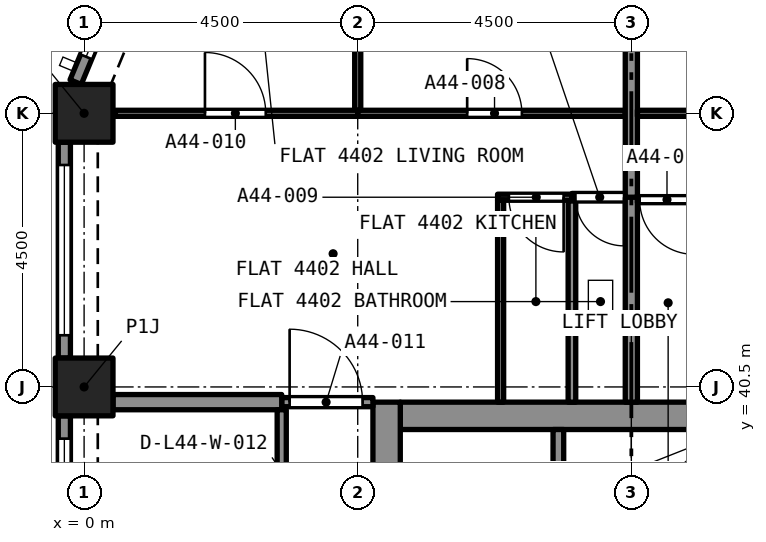
"""IFC4 building model, lengths in metres.
Left out: names, types, materials, properties, quantities, classifications, styles, units other than length and angle.
Written with IfcOpenShell. Run it as: python <this file> out.ifc"""

import sys

from ifc_helpers import new_model, si_unit, direction, frame, frame_2d, origin, origin_2d, place, context, subcontext, project, spatial, rectangle, extrude, element, fill, save


model = new_model("IFC4")
c1 = context("Model", 3, precision=1e-05, world=origin(), true_north=direction((0.0, 1.0)))
c2 = subcontext(c1, "Body", "Model", "MODEL_VIEW")
j1 = project(units=[si_unit("LENGTHUNIT", "METRE"), si_unit("PLANEANGLEUNIT", "RADIAN")], contexts=[c1])
p1 = place(None, origin())
s1 = spatial("IfcSite", under=j1, at=p1, CompositionType="ELEMENT")
p2 = place(p1, origin())
s2 = spatial("IfcBuilding", under=s1, at=p2, CompositionType="ELEMENT")
p3 = place(p2, frame((0.0, 0.0, 159.4)))
s3 = spatial("IfcBuildingStorey", under=s2, at=p3, CompositionType="ELEMENT", Elevation=159.4)
for number, where, z_axis, x_axis in (
    (1, (0.0, 40.5, 0.0), (0.0, 0.0, 1.0), (1.0, 0.0, 0.0)),
    (2, (0.0, 45.0, 0.0), (0.0, 0.0, 1.0), (1.0, 0.0, 0.0)),
):
    element("IfcColumn", number, at=place(p3, frame(where, z_axis=z_axis, x_axis=x_axis)), inside=s3, PredefinedType="COLUMN", context=c2, shape_type="SweptSolid", body=[
        extrude(rectangle(XDim=0.95, YDim=0.95, at=origin_2d()), origin(), (0.0, 0.0, 1.0), 4.4),
    ])
p4 = place(p3, frame((5.2, 40.025, 0.0), z_axis=(0.0, 0.0, 1.0), x_axis=(1.0, 0.0, 0.0)))
e3 = element("IfcWall", 3, at=p4, inside=s3, PredefinedType="SOLIDWALL", context=c2, shape_type="SweptSolid", body=[
    extrude(rectangle(XDim=7.6, YDim=0.45, at=frame_2d((3.8, 0.0))), origin(), (0.0, 0.0, 1.0), 4.4),
])
p5 = place(p3, frame((4.975, 27.25, 0.0), z_axis=(0.0, 0.0, 1.0), x_axis=(0.0, 1.0, 0.0)))
e4 = element("IfcWall", 4, at=p5, inside=s3, PredefinedType="SOLIDWALL", context=c2, shape_type="SweptSolid", body=[
    extrude(rectangle(XDim=13.0, YDim=0.45, at=frame_2d((6.5, 0.0))), origin(), (0.0, 0.0, 1.0), 4.4),
])
p6 = place(p5, frame((8.7, 0.0, 0.0)))
e5 = element("IfcOpeningElement", 5, at=p6, cuts=e4, PredefinedType="OPENING", context=c2, shape_type="SweptSolid", body=[
    extrude(rectangle(XDim=1.2, YDim=2.1, at=frame_2d((0.6, 1.05))), frame((0.0, 0.235, 0.0), z_axis=(0.0, -1.0, 0.0), x_axis=(1.0, 0.0, 0.0)), (0.0, 0.0, 1.0), 0.47),
])
p7 = place(p3, frame((-0.139, 45.513, 0.0), z_axis=(0.0, 0.0, 1.0), x_axis=(0.382680855588, 0.923880599843, 0.0)))
e6 = element("IfcWall", 6, at=p7, inside=s3, PredefinedType="SOLIDWALL", context=c2, shape_type="SweptSolid", body=[
    extrude(rectangle(XDim=2.403, YDim=0.2, at=frame_2d((1.201, 0.0))), origin(), (0.0, 0.0, 1.0), 4.4),
])
p8 = place(p7, frame((0.451, 0.0, 0.45)))
e7 = element("IfcOpeningElement", 7, at=p8, cuts=e6, PredefinedType="OPENING", context=c2, shape_type="SweptSolid", body=[
    extrude(rectangle(XDim=1.7, YDim=2.55, at=frame_2d((0.85, 1.275))), frame((0.0, 0.11, 0.0), z_axis=(0.0, -1.0, 0.0), x_axis=(1.0, 0.0, 0.0)), (0.0, 0.0, 1.0), 0.22),
])
p9 = place(p3, frame((-0.325, 40.975, 0.0), z_axis=(0.0, 0.0, 1.0), x_axis=(0.0, 1.0, 0.0)))
e8 = element("IfcWall", 8, at=p9, inside=s3, PredefinedType="SOLIDWALL", context=c2, shape_type="SweptSolid", body=[
    extrude(rectangle(XDim=3.55, YDim=0.2, at=frame_2d((1.775, 0.0))), origin(), (0.0, 0.0, 1.0), 4.4),
])
p10 = place(p9, frame((0.375, 0.0, 0.45)))
e9 = element("IfcOpeningElement", 9, at=p10, cuts=e8, PredefinedType="OPENING", context=c2, shape_type="SweptSolid", body=[
    extrude(rectangle(XDim=2.8, YDim=2.55, at=frame_2d((1.4, 1.275))), frame((0.0, 0.11, 0.0), z_axis=(0.0, -1.0, 0.0), x_axis=(1.0, 0.0, 0.0)), (0.0, 0.0, 1.0), 0.22),
])
p11 = place(p3, frame((-0.325, 36.475, 0.0), z_axis=(0.0, 0.0, 1.0), x_axis=(0.0, 1.0, 0.0)))
e10 = element("IfcWall", 10, at=p11, inside=s3, PredefinedType="SOLIDWALL", context=c2, shape_type="SweptSolid", body=[
    extrude(rectangle(XDim=3.55, YDim=0.2, at=frame_2d((1.775, 0.0))), origin(), (0.0, 0.0, 1.0), 4.4),
])
p12 = place(p11, frame((0.375, 0.0, 0.45)))
e11 = element("IfcOpeningElement", 11, at=p12, cuts=e10, PredefinedType="OPENING", context=c2, shape_type="SweptSolid", body=[
    extrude(rectangle(XDim=2.8, YDim=2.55, at=frame_2d((1.4, 1.275))), frame((0.0, 0.11, 0.0), z_axis=(0.0, -1.0, 0.0), x_axis=(1.0, 0.0, 0.0)), (0.0, 0.0, 1.0), 0.22),
])
p13 = place(p3, frame((9.0, 43.62, 0.0), z_axis=(0.0, 0.0, 1.0), x_axis=(-1.0, 0.0, 0.0)))
e12 = element("IfcWall", 12, at=p13, inside=s3, PredefinedType="PARTITIONING", context=c2, shape_type="SweptSolid", body=[
    extrude(rectangle(XDim=0.977, YDim=0.125, at=frame_2d((0.489, 0.0))), origin(), (0.0, 0.0, 1.0), 4.1),
])
p14 = place(p13, frame((0.12, 0.0, 0.0)))
e13 = element("IfcOpeningElement", 13, at=p14, cuts=e12, PredefinedType="OPENING", context=c2, shape_type="SweptSolid", body=[
    extrude(rectangle(XDim=0.8, YDim=2.1, at=frame_2d((0.4, 1.05))), frame((0.0, 0.073, 0.0), z_axis=(0.0, -1.0, 0.0), x_axis=(1.0, 0.0, 0.0)), (0.0, 0.0, 1.0), 0.145),
])
p15 = place(p3, frame((8.023, 40.25, 0.0), z_axis=(0.0, 0.0, 1.0), x_axis=(0.0, 1.0, 0.0)))
e14 = element("IfcWall", 14, at=p15, inside=s3, PredefinedType="PARTITIONING", context=c2, shape_type="SweptSolid", body=[
    extrude(rectangle(XDim=3.308, YDim=0.125, at=frame_2d((1.654, 0.0))), origin(), (0.0, 0.0, 1.0), 4.1),
])
p16 = place(p3, frame((9.0, 40.25, 0.0), z_axis=(0.0, 0.0, 1.0), x_axis=(0.0, 1.0, 0.0)))
e15 = element("IfcWall", 15, at=p16, inside=s3, PredefinedType="PARTITIONING", context=c2, shape_type="SweptSolid", body=[
    extrude(rectangle(XDim=3.38, YDim=0.2, at=frame_2d((1.69, 0.0))), origin(), (0.0, 0.0, 1.0), 4.1),
])
p17 = place(p3, frame((4.5, 45.0, 0.0), z_axis=(0.0, 0.0, 1.0), x_axis=(1.0, 0.0, 0.0)))
e16 = element("IfcWall", 16, at=p17, inside=s3, PredefinedType="PARTITIONING", context=c2, shape_type="SweptSolid", body=[
    extrude(rectangle(XDim=4.4, YDim=0.1, at=frame_2d((2.2, 0.0))), origin(), (0.0, 0.0, 1.0), 4.1),
])
p18 = place(p17, frame((1.8, 0.0, 0.0)))
e17 = element("IfcOpeningElement", 17, at=p18, cuts=e16, PredefinedType="OPENING", context=c2, shape_type="SweptSolid", body=[
    extrude(rectangle(XDim=0.9, YDim=2.1, at=frame_2d((0.45, 1.05))), frame((0.0, 0.06, 0.0), z_axis=(0.0, -1.0, 0.0), x_axis=(1.0, 0.0, 0.0)), (0.0, 0.0, 1.0), 0.12),
])
p19 = place(p3, frame((4.5, 45.05, 0.0), z_axis=(0.0, 0.0, 1.0), x_axis=(0.0, 1.0, 0.0)))
e18 = element("IfcWall", 18, at=p19, inside=s3, PredefinedType="PARTITIONING", context=c2, shape_type="SweptSolid", body=[
    extrude(rectangle(XDim=3.936, YDim=0.1, at=frame_2d((1.968, 0.0))), origin(), (0.0, 0.0, 1.0), 4.1),
])
p20 = place(p3, frame((8.023, 43.62, 0.0), z_axis=(0.0, 0.0, 1.0), x_axis=(-1.0, 0.0, 0.0)))
e19 = element("IfcWall", 19, at=p20, inside=s3, PredefinedType="PARTITIONING", context=c2, shape_type="SweptSolid", body=[
    extrude(rectangle(XDim=1.223, YDim=0.1, at=frame_2d((0.611, 0.0))), origin(), (0.0, 0.0, 1.0), 4.1),
])
p21 = place(p20, frame((0.136, 0.0, 0.0)))
e20 = element("IfcOpeningElement", 20, at=p21, cuts=e19, PredefinedType="OPENING", context=c2, shape_type="SweptSolid", body=[
    extrude(rectangle(XDim=0.9, YDim=2.1, at=frame_2d((0.45, 1.05))), frame((0.0, 0.06, 0.0), z_axis=(0.0, -1.0, 0.0), x_axis=(1.0, 0.0, 0.0)), (0.0, 0.0, 1.0), 0.12),
])
p22 = place(p3, frame((6.85, 40.25, 0.0), z_axis=(0.0, 0.0, 1.0), x_axis=(0.0, 1.0, 0.0)))
e21 = element("IfcWall", 21, at=p22, inside=s3, PredefinedType="PARTITIONING", context=c2, shape_type="SweptSolid", body=[
    extrude(rectangle(XDim=3.32, YDim=0.1, at=frame_2d((1.66, 0.0))), origin(), (0.0, 0.0, 1.0), 4.1),
])
p23 = place(p3, frame((0.514, 45.0, 0.0), z_axis=(0.0, 0.0, 1.0), x_axis=(1.0, 0.0, 0.0)))
e22 = element("IfcWall", 22, at=p23, inside=s3, PredefinedType="PARTITIONING", context=c2, shape_type="SweptSolid", body=[
    extrude(rectangle(XDim=3.986, YDim=0.1, at=frame_2d((1.993, 0.0))), origin(), (0.0, 0.0, 1.0), 4.1),
])
p24 = place(p23, frame((1.473, 0.0, 0.0)))
e23 = element("IfcOpeningElement", 23, at=p24, cuts=e22, PredefinedType="OPENING", context=c2, shape_type="SweptSolid", body=[
    extrude(rectangle(XDim=1.0, YDim=2.1, at=frame_2d((0.5, 1.05))), frame((0.0, 0.06, 0.0), z_axis=(0.0, -1.0, 0.0), x_axis=(1.0, 0.0, 0.0)), (0.0, 0.0, 1.0), 0.12),
])
p25 = place(p3, frame((9.0, 43.62, 0.0), z_axis=(0.0, 0.0, 1.0), x_axis=(0.0, 1.0, 0.0)))
e24 = element("IfcWall", 24, at=p25, inside=s3, PredefinedType="PARTITIONING", context=c2, shape_type="SweptSolid", body=[
    extrude(rectangle(XDim=5.405, YDim=0.2, at=frame_2d((2.702, 0.0))), origin(), (0.0, 0.0, 1.0), 4.1),
])
p26 = place(p3, frame((3.25, 40.25, 0.0), z_axis=(0.0, 0.0, 1.0), x_axis=(1.0, 0.0, 0.0)))
e25 = element("IfcWall", 25, at=p26, inside=s3, PredefinedType="PARTITIONING", context=c2, shape_type="SweptSolid", body=[
    extrude(rectangle(XDim=1.5, YDim=0.15, at=frame_2d((0.75, 0.0))), origin(), (0.0, 0.0, 1.0), 4.1),
])
p27 = place(p26, frame((0.13, 0.0, 0.0)))
e26 = element("IfcOpeningElement", 26, at=p27, cuts=e25, PredefinedType="OPENING", context=c2, shape_type="SweptSolid", body=[
    extrude(rectangle(XDim=1.2, YDim=2.4, at=frame_2d((0.6, 1.2))), frame((0.0, 0.085, 0.0), z_axis=(0.0, -1.0, 0.0), x_axis=(1.0, 0.0, 0.0)), (0.0, 0.0, 1.0), 0.17),
])
p28 = place(p3, frame((0.475, 40.25, 0.0), z_axis=(0.0, 0.0, 1.0), x_axis=(1.0, 0.0, 0.0)))
e27 = element("IfcWall", 27, at=p28, inside=s3, PredefinedType="PARTITIONING", context=c2, shape_type="SweptSolid", body=[
    extrude(rectangle(XDim=2.775, YDim=0.25, at=frame_2d((1.387, 0.0))), origin(), (0.0, 0.0, 1.0), 4.1),
])
p29 = place(p3, frame((9.1, 45.0, 0.0), z_axis=(0.0, 0.0, 1.0), x_axis=(1.0, 0.0, 0.0)))
e28 = element("IfcWall", 28, at=p29, inside=s3, PredefinedType="PARTITIONING", context=c2, shape_type="SweptSolid", body=[
    extrude(rectangle(XDim=4.4, YDim=0.1, at=frame_2d((2.2, 0.0))), origin(), (0.0, 0.0, 1.0), 4.1),
])
p30 = place(p29, frame((1.7, 0.0, 0.0)))
e29 = element("IfcOpeningElement", 29, at=p30, cuts=e28, PredefinedType="OPENING", context=c2, shape_type="SweptSolid", body=[
    extrude(rectangle(XDim=0.9, YDim=2.1, at=frame_2d((0.45, 1.05))), frame((0.0, 0.06, 0.0), z_axis=(0.0, -1.0, 0.0), x_axis=(1.0, 0.0, 0.0)), (0.0, 0.0, 1.0), 0.12),
])
p31 = place(p3, frame((10.173, 43.58, 0.0), z_axis=(0.0, 0.0, 1.0), x_axis=(-1.0, 0.0, 0.0)))
e30 = element("IfcWall", 30, at=p31, inside=s3, PredefinedType="PARTITIONING", context=c2, shape_type="SweptSolid", body=[
    extrude(rectangle(XDim=1.073, YDim=0.1, at=frame_2d((0.536, 0.0))), origin(), (0.0, 0.0, 1.0), 4.1),
])
p32 = place(p31, frame((0.136, 0.0, 0.0)))
e31 = element("IfcOpeningElement", 31, at=p32, cuts=e30, PredefinedType="OPENING", context=c2, shape_type="SweptSolid", body=[
    extrude(rectangle(XDim=0.9, YDim=2.1, at=frame_2d((0.45, 1.05))), frame((0.0, 0.06, 0.0), z_axis=(0.0, -1.0, 0.0), x_axis=(1.0, 0.0, 0.0)), (0.0, 0.0, 1.0), 0.12),
])
p33 = place(p3, frame((3.25, 36.0, 0.0), z_axis=(0.0, 0.0, 1.0), x_axis=(0.0, 1.0, 0.0)))
e32 = element("IfcWall", 32, at=p33, inside=s3, PredefinedType="PARTITIONING", context=c2, shape_type="SweptSolid", body=[
    extrude(rectangle(XDim=4.125, YDim=0.15, at=frame_2d((2.062, 0.0))), origin(), (0.0, 0.0, 1.0), 4.1),
])
p34 = place(p33, frame((1.625, 0.0, 0.0)))
e33 = element("IfcOpeningElement", 33, at=p34, cuts=e32, PredefinedType="OPENING", context=c2, shape_type="SweptSolid", body=[
    extrude(rectangle(XDim=1.0, YDim=2.1, at=frame_2d((0.5, 1.05))), frame((0.0, 0.085, 0.0), z_axis=(0.0, -1.0, 0.0), x_axis=(1.0, 0.0, 0.0)), (0.0, 0.0, 1.0), 0.17),
])
p35 = place(p3, frame((7.8, 37.5, 0.0), z_axis=(0.0, 0.0, 1.0), x_axis=(0.0, 1.0, 0.0)))
e34 = element("IfcWall", 34, at=p35, inside=s3, PredefinedType="SOLIDWALL", context=c2, shape_type="SweptSolid", body=[
    extrude(rectangle(XDim=2.3, YDim=0.175, at=frame_2d((1.15, 0.0))), origin(), (0.0, 0.0, 1.0), 4.1),
])
p36 = place(p8, origin())
e35 = element("IfcWindow", 35, at=p36, inside=s3, PartitioningType="SINGLE_PANEL", PredefinedType="WINDOW", context=c2, shape_type="SweptSolid", body=[
    extrude(rectangle(XDim=1.7, YDim=2.55, at=frame_2d((0.85, 1.275))), frame((0.0, 0.03, 0.0), z_axis=(0.0, -1.0, 0.0), x_axis=(1.0, 0.0, 0.0)), (0.0, 0.0, 1.0), 0.06),
])
fill(e7, e35)
p37 = place(p10, origin())
e36 = element("IfcWindow", 36, at=p37, inside=s3, PartitioningType="SINGLE_PANEL", PredefinedType="WINDOW", context=c2, shape_type="SweptSolid", body=[
    extrude(rectangle(XDim=2.8, YDim=2.55, at=frame_2d((1.4, 1.275))), frame((0.0, 0.03, 0.0), z_axis=(0.0, -1.0, 0.0), x_axis=(1.0, 0.0, 0.0)), (0.0, 0.0, 1.0), 0.06),
])
fill(e9, e36)
p38 = place(p12, origin())
e37 = element("IfcWindow", 37, at=p38, inside=s3, PartitioningType="SINGLE_PANEL", PredefinedType="WINDOW", context=c2, shape_type="SweptSolid", body=[
    extrude(rectangle(XDim=2.8, YDim=2.55, at=frame_2d((1.4, 1.275))), frame((0.0, 0.03, 0.0), z_axis=(0.0, -1.0, 0.0), x_axis=(1.0, 0.0, 0.0)), (0.0, 0.0, 1.0), 0.06),
])
fill(e11, e37)
p39 = place(p14, origin())
e38 = element("IfcDoor", 38, at=p39, inside=s3, OperationType="SINGLE_SWING_LEFT", PredefinedType="DOOR", context=c2, shape_type="SweptSolid", body=[
    extrude(rectangle(XDim=0.8, YDim=2.1, at=frame_2d((0.4, 1.05))), frame((0.0, 0.025, 0.0), z_axis=(0.0, -1.0, 0.0), x_axis=(1.0, 0.0, 0.0)), (0.0, 0.0, 1.0), 0.05),
])
fill(e13, e38)
p40 = place(p18, origin())
e39 = element("IfcDoor", 39, at=p40, inside=s3, OperationType="SINGLE_SWING_RIGHT", PredefinedType="DOOR", context=c2, shape_type="SweptSolid", body=[
    extrude(rectangle(XDim=0.9, YDim=2.1, at=frame_2d((0.45, 1.05))), frame((0.0, 0.025, 0.0), z_axis=(0.0, -1.0, 0.0), x_axis=(1.0, 0.0, 0.0)), (0.0, 0.0, 1.0), 0.05),
])
fill(e17, e39)
p41 = place(p21, origin())
e40 = element("IfcDoor", 40, at=p41, inside=s3, OperationType="SINGLE_SWING_LEFT", PredefinedType="DOOR", context=c2, shape_type="SweptSolid", body=[
    extrude(rectangle(XDim=0.9, YDim=2.1, at=frame_2d((0.45, 1.05))), frame((0.0, 0.025, 0.0), z_axis=(0.0, -1.0, 0.0), x_axis=(1.0, 0.0, 0.0)), (0.0, 0.0, 1.0), 0.05),
])
fill(e20, e40)
p42 = place(p24, origin())
e41 = element("IfcDoor", 41, at=p42, inside=s3, OperationType="SINGLE_SWING_LEFT", PredefinedType="DOOR", context=c2, shape_type="SweptSolid", body=[
    extrude(rectangle(XDim=1.0, YDim=2.1, at=frame_2d((0.5, 1.05))), frame((0.0, 0.025, 0.0), z_axis=(0.0, -1.0, 0.0), x_axis=(1.0, 0.0, 0.0)), (0.0, 0.0, 1.0), 0.05),
])
fill(e23, e41)
p43 = place(p27, origin())
e42 = element("IfcDoor", 42, at=p43, inside=s3, OperationType="SINGLE_SWING_LEFT", PredefinedType="DOOR", context=c2, shape_type="SweptSolid", body=[
    extrude(rectangle(XDim=1.2, YDim=2.4, at=frame_2d((0.6, 1.2))), frame((0.0, 0.025, 0.0), z_axis=(0.0, -1.0, 0.0), x_axis=(1.0, 0.0, 0.0)), (0.0, 0.0, 1.0), 0.05),
])
fill(e26, e42)
p44 = place(p32, origin())
e43 = element("IfcDoor", 43, at=p44, inside=s3, OperationType="SINGLE_SWING_RIGHT", PredefinedType="DOOR", context=c2, shape_type="SweptSolid", body=[
    extrude(rectangle(XDim=0.9, YDim=2.1, at=frame_2d((0.45, 1.05))), frame((0.0, 0.025, 0.0), z_axis=(0.0, -1.0, 0.0), x_axis=(1.0, 0.0, 0.0)), (0.0, 0.0, 1.0), 0.05),
])
fill(e31, e43)
save(model, sys.argv[1])
